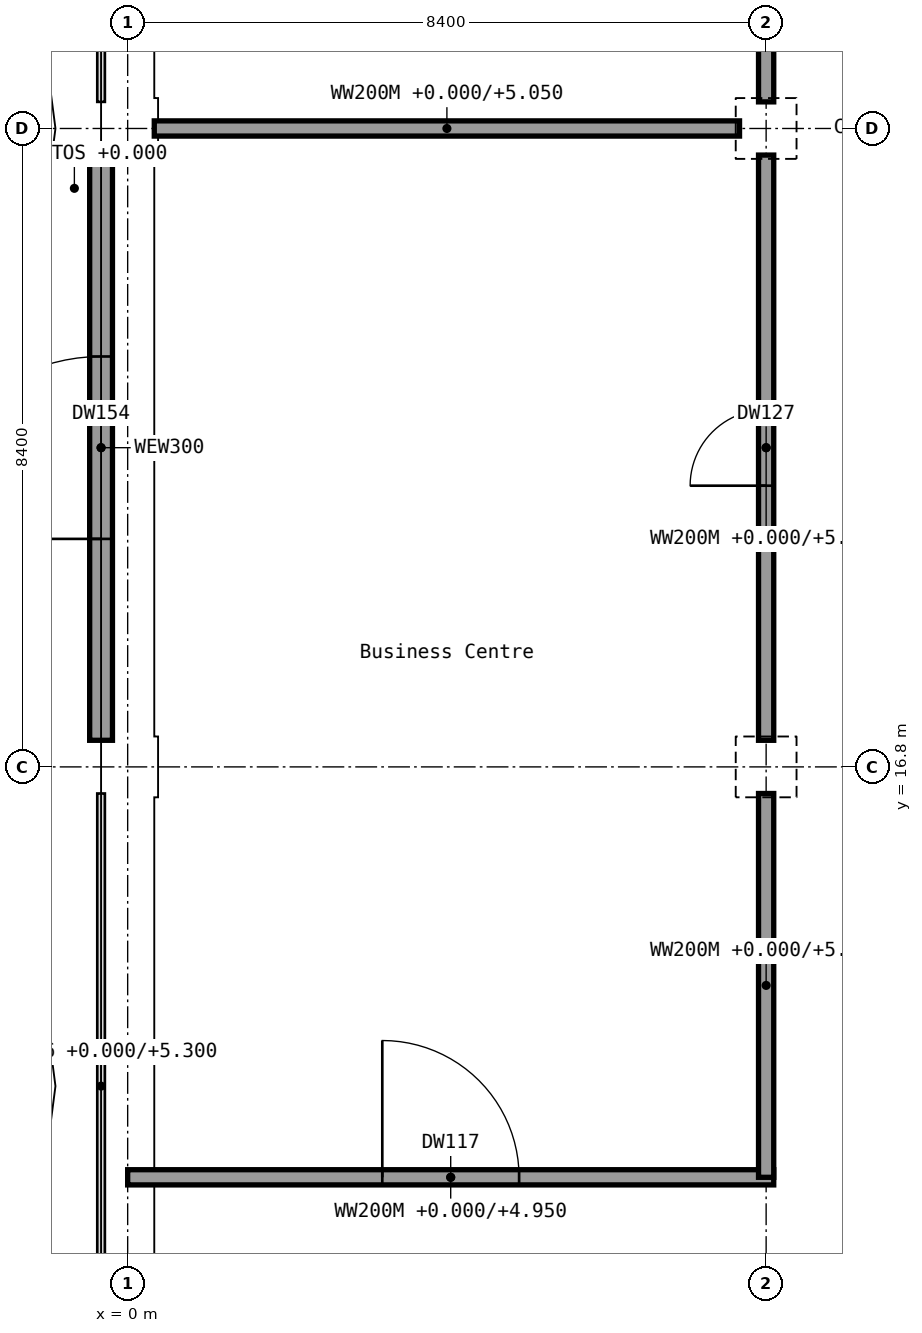
"""IFC4 building model, lengths in metres.
Left out: names, types, materials, properties, quantities, classifications, styles, units other than length and angle.
Written with IfcOpenShell. Run it as: python <this file> out.ifc"""

import sys

from ifc_helpers import new_model, si_unit, direction, frame, frame_2d, origin, origin_2d, place, context, subcontext, project, spatial, rectangle, extrude, element, fill, save


model = new_model("IFC4")
c1 = context("Model", 3, precision=1e-05, world=origin(), true_north=direction((0.0, 1.0)))
c2 = subcontext(c1, "Body", "Model", "MODEL_VIEW")
j1 = project(units=[si_unit("LENGTHUNIT", "METRE"), si_unit("PLANEANGLEUNIT", "RADIAN")], contexts=[c1])
p1 = place(None, origin())
s1 = spatial("IfcSite", under=j1, at=p1, CompositionType="ELEMENT")
p2 = place(p1, origin())
s2 = spatial("IfcBuilding", under=s1, at=p2, CompositionType="ELEMENT")
p3 = place(p2, origin())
s3 = spatial("IfcBuildingStorey", under=s2, at=p3, CompositionType="ELEMENT", Elevation=0.0)
for number, where, z_axis, x_axis in (
    (1, (0.0, 16.8, 0.0), (0.0, 0.0, 1.0), (1.0, 0.0, 0.0)),
    (2, (0.0, 25.2, 0.0), (0.0, 0.0, 1.0), (1.0, 0.0, 0.0)),
    (3, (8.4, 16.8, 0.0), (0.0, 0.0, 1.0), (1.0, 0.0, 0.0)),
    (4, (8.4, 25.2, 0.0), (0.0, 0.0, 1.0), (1.0, 0.0, 0.0)),
):
    element("IfcColumn", number, at=place(p3, frame(where, z_axis=z_axis, x_axis=x_axis)), inside=s3, PredefinedType="COLUMN", context=c2, shape_type="SweptSolid", body=[
        extrude(rectangle(XDim=0.7, YDim=0.7, at=origin_2d()), origin(), (0.0, 0.0, 1.0), 6.0),
    ])
p4 = place(p3, frame((-0.35, 17.15, 0.0), z_axis=(0.0, 0.0, 1.0), x_axis=(0.0, 1.0, 0.0)))
e5 = element("IfcWall", 5, at=p4, inside=s3, PredefinedType="SOLIDWALL", context=c2, shape_type="SweptSolid", body=[
    extrude(rectangle(XDim=7.7, YDim=0.3, at=frame_2d((3.85, 0.0))), origin(), (0.0, 0.0, 1.0), 5.3),
])
p5 = place(p4, frame((2.65, 0.0, 0.0)))
e6 = element("IfcOpeningElement", 6, at=p5, cuts=e5, PredefinedType="OPENING", context=c2, shape_type="SweptSolid", body=[
    extrude(rectangle(XDim=2.4, YDim=2.4, at=frame_2d((1.2, 1.2))), frame((0.0, 0.15, 0.0), z_axis=(0.0, -1.0, 0.0), x_axis=(1.0, 0.0, 0.0)), (0.0, 0.0, 1.0), 0.3),
])
p6 = place(p3, frame((0.0, 11.4, 0.0), z_axis=(0.0, 0.0, 1.0), x_axis=(1.0, 0.0, 0.0)))
e7 = element("IfcWall", 7, at=p6, inside=s3, PredefinedType="PARTITIONING", context=c2, shape_type="SweptSolid", body=[
    extrude(rectangle(XDim=8.5, YDim=0.2, at=frame_2d((4.25, 0.0))), origin(), (0.0, 0.0, 1.0), 4.95),
])
p7 = place(p6, frame((3.35, 0.0, 0.0)))
e8 = element("IfcOpeningElement", 8, at=p7, cuts=e7, PredefinedType="OPENING", context=c2, shape_type="SweptSolid", body=[
    extrude(rectangle(XDim=1.8, YDim=2.1, at=frame_2d((0.9, 1.05))), frame((0.0, 0.1, 0.0), z_axis=(0.0, -1.0, 0.0), x_axis=(1.0, 0.0, 0.0)), (0.0, 0.0, 1.0), 0.2),
])
p8 = place(p3, frame((0.35, 25.2, 0.0), z_axis=(0.0, 0.0, 1.0), x_axis=(1.0, 0.0, 0.0)))
e9 = element("IfcWall", 9, at=p8, inside=s3, PredefinedType="PARTITIONING", context=c2, shape_type="SweptSolid", body=[
    extrude(rectangle(XDim=7.7, YDim=0.2, at=frame_2d((3.85, 0.0))), origin(), (0.0, 0.0, 1.0), 5.05),
])
p9 = place(p3, frame((8.4, 11.4, 0.0), z_axis=(0.0, 0.0, 1.0), x_axis=(0.0, 1.0, 0.0)))
e10 = element("IfcWall", 10, at=p9, inside=s3, PredefinedType="PARTITIONING", context=c2, shape_type="SweptSolid", body=[
    extrude(rectangle(XDim=5.05, YDim=0.2, at=frame_2d((2.525, 0.0))), origin(), (0.0, 0.0, 1.0), 5.05),
])
p10 = place(p3, frame((8.4, 17.15, 0.0), z_axis=(0.0, 0.0, 1.0), x_axis=(0.0, 1.0, 0.0)))
e11 = element("IfcWall", 11, at=p10, inside=s3, PredefinedType="PARTITIONING", context=c2, shape_type="SweptSolid", body=[
    extrude(rectangle(XDim=7.7, YDim=0.2, at=frame_2d((3.85, 0.0))), origin(), (0.0, 0.0, 1.0), 5.05),
])
p11 = place(p10, frame((3.35, 0.0, 0.0)))
e12 = element("IfcOpeningElement", 12, at=p11, cuts=e11, PredefinedType="OPENING", context=c2, shape_type="SweptSolid", body=[
    extrude(rectangle(XDim=1.0, YDim=2.1, at=frame_2d((0.5, 1.05))), frame((0.0, 0.1, 0.0), z_axis=(0.0, -1.0, 0.0), x_axis=(1.0, 0.0, 0.0)), (0.0, 0.0, 1.0), 0.2),
])
p12 = place(p3, frame((8.4, 25.55, 0.0), z_axis=(0.0, 0.0, 1.0), x_axis=(0.0, 1.0, 0.0)))
e13 = element("IfcWall", 13, at=p12, inside=s3, PredefinedType="PARTITIONING", context=c2, shape_type="SweptSolid", body=[
    extrude(rectangle(XDim=7.7, YDim=0.2, at=frame_2d((3.85, 0.0))), origin(), (0.0, 0.0, 1.0), 5.05),
])
p13 = place(p12, frame((3.35, 0.0, 0.0)))
e14 = element("IfcOpeningElement", 14, at=p13, cuts=e13, PredefinedType="OPENING", context=c2, shape_type="SweptSolid", body=[
    extrude(rectangle(XDim=1.0, YDim=2.1, at=frame_2d((0.5, 1.05))), frame((0.0, 0.1, 0.0), z_axis=(0.0, -1.0, 0.0), x_axis=(1.0, 0.0, 0.0)), (0.0, 0.0, 1.0), 0.2),
])
p14 = place(p5, origin())
e15 = element("IfcDoor", 15, at=p14, inside=s3, OperationType="DOUBLE_DOOR_DOUBLE_SWING", PredefinedType="DOOR", context=c2, shape_type="SweptSolid", body=[
    extrude(rectangle(XDim=2.4, YDim=2.4, at=frame_2d((1.2, 1.2))), frame((0.0, 0.025, 0.0), z_axis=(0.0, -1.0, 0.0), x_axis=(1.0, 0.0, 0.0)), (0.0, 0.0, 1.0), 0.05),
])
fill(e6, e15)
p15 = place(p7, origin())
e16 = element("IfcDoor", 16, at=p15, inside=s3, OperationType="DOUBLE_DOOR_DOUBLE_SWING", PredefinedType="DOOR", context=c2, shape_type="SweptSolid", body=[
    extrude(rectangle(XDim=1.8, YDim=2.1, at=frame_2d((0.9, 1.05))), frame((0.0, 0.025, 0.0), z_axis=(0.0, -1.0, 0.0), x_axis=(1.0, 0.0, 0.0)), (0.0, 0.0, 1.0), 0.05),
])
fill(e8, e16)
p16 = place(p11, origin())
e17 = element("IfcDoor", 17, at=p16, inside=s3, OperationType="SINGLE_SWING_LEFT", PredefinedType="DOOR", context=c2, shape_type="SweptSolid", body=[
    extrude(rectangle(XDim=1.0, YDim=2.1, at=frame_2d((0.5, 1.05))), frame((0.0, 0.025, 0.0), z_axis=(0.0, -1.0, 0.0), x_axis=(1.0, 0.0, 0.0)), (0.0, 0.0, 1.0), 0.05),
])
fill(e12, e17)
save(model, sys.argv[1])
